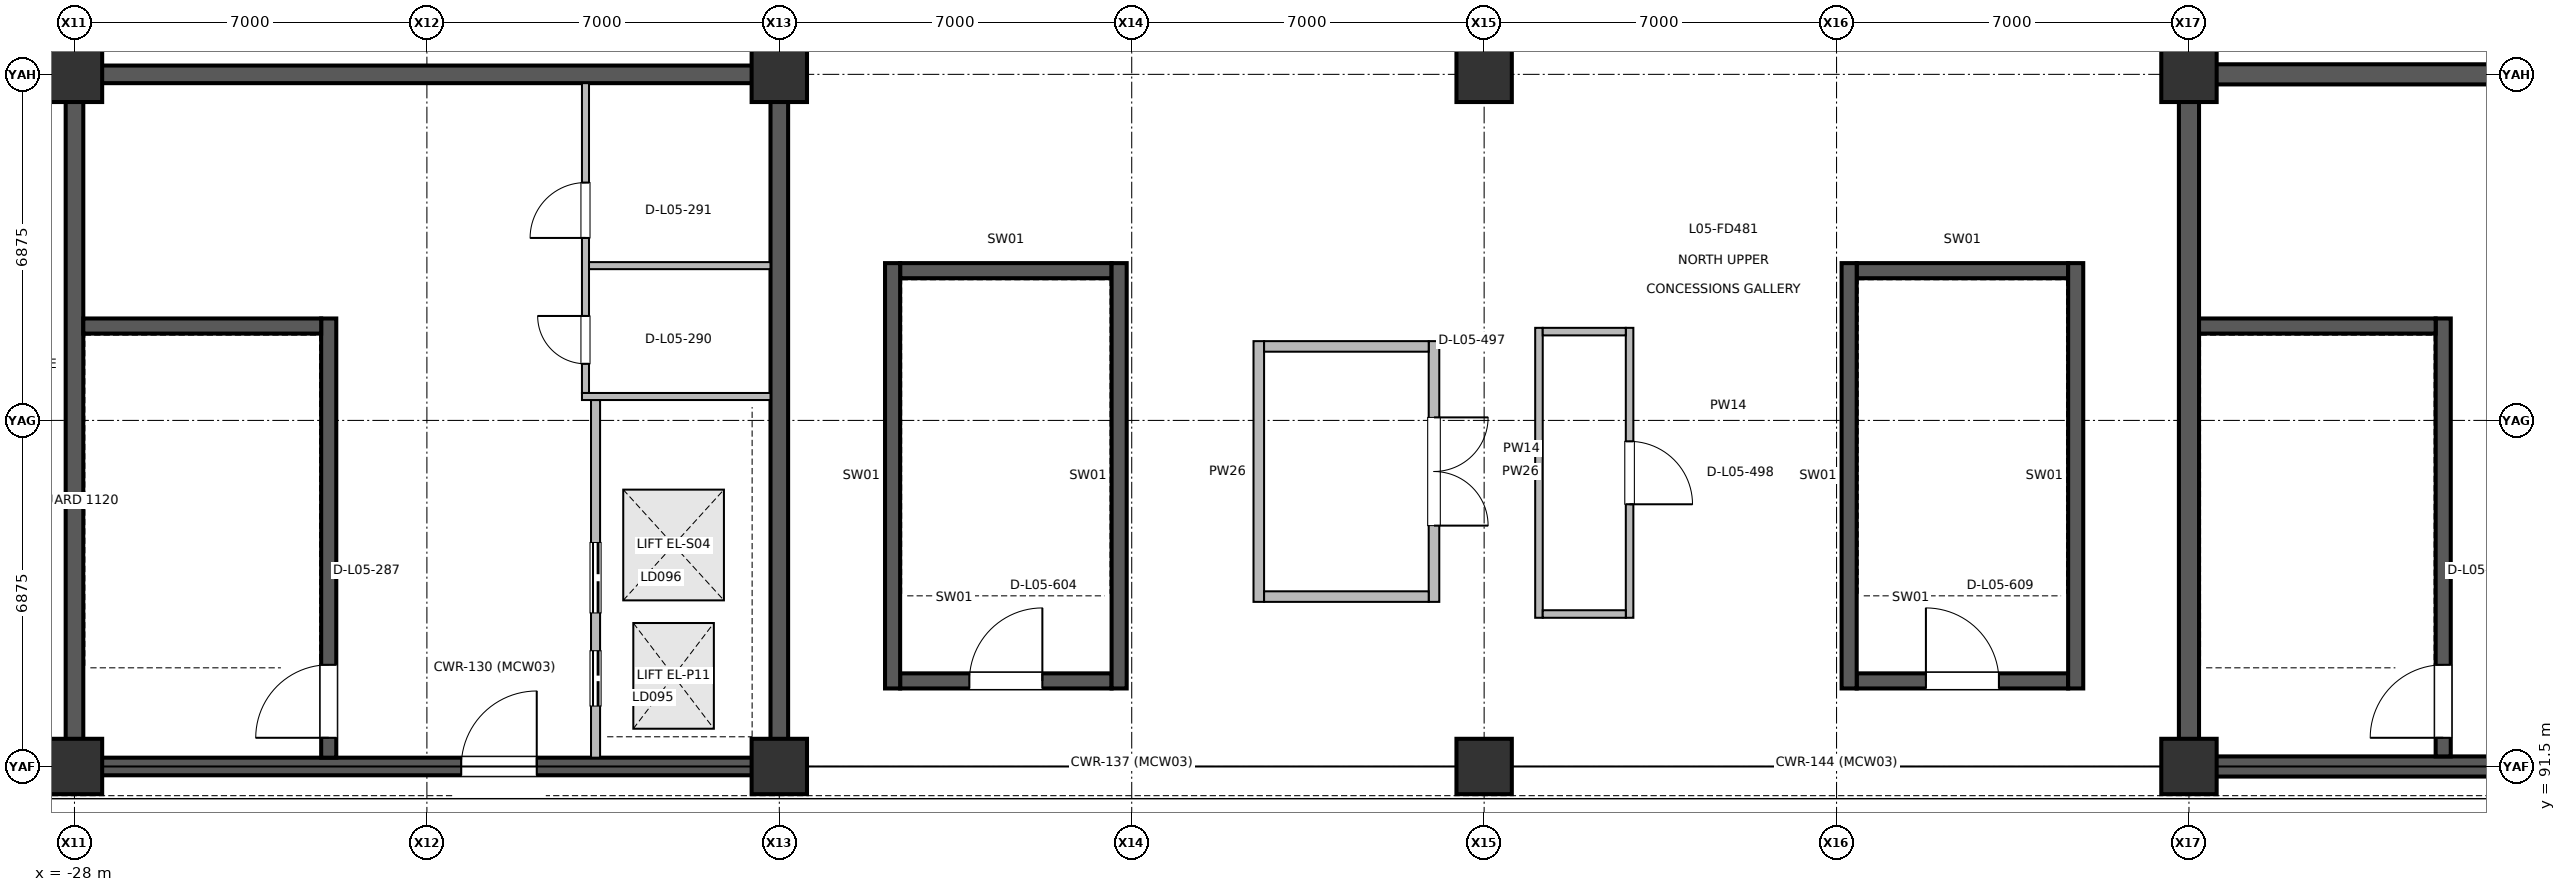
"""IFC4 building model, lengths in metres.
Left out: names, types, materials, properties, quantities, classifications, styles, units other than length and angle.
Written with IfcOpenShell. Run it as: python <this file> out.ifc"""

import sys

from ifc_helpers import new_model, si_unit, direction, frame, frame_2d, origin, origin_2d, place, context, subcontext, project, spatial, rectangle, circle, extrude, element, fill, save


model = new_model("IFC4")
c1 = context("Model", 3, precision=1e-05, world=origin(), true_north=direction((0.0, 1.0)))
c2 = subcontext(c1, "Body", "Model", "MODEL_VIEW")
j1 = project(units=[si_unit("LENGTHUNIT", "METRE"), si_unit("PLANEANGLEUNIT", "RADIAN")], contexts=[c1])
p1 = place(None, origin())
s1 = spatial("IfcSite", under=j1, at=p1, CompositionType="ELEMENT")
p2 = place(p1, origin())
s2 = spatial("IfcBuilding", under=s1, at=p2, CompositionType="ELEMENT")
p3 = place(p2, frame((0.0, 0.0, 21.0)))
s3 = spatial("IfcBuildingStorey", under=s2, at=p3, CompositionType="ELEMENT", Elevation=21.0)
for number, where, z_axis, x_axis in (
    (1, (-28.0, 91.5, 0.0), (0.0, 0.0, 1.0), (1.0, 0.0, 0.0)),
    (2, (-28.0, 105.25, 0.0), (0.0, 0.0, 1.0), (1.0, 0.0, 0.0)),
    (3, (-14.0, 91.5, 0.0), (0.0, 0.0, 1.0), (1.0, 0.0, 0.0)),
    (4, (-14.0, 105.25, 0.0), (0.0, 0.0, 1.0), (1.0, 0.0, 0.0)),
    (5, (0.0, 91.5, 0.0), (0.0, 0.0, 1.0), (1.0, 0.0, 0.0)),
    (6, (0.0, 105.25, 0.0), (0.0, 0.0, 1.0), (1.0, 0.0, 0.0)),
    (7, (14.0, 91.5, 0.0), (0.0, 0.0, 1.0), (1.0, 0.0, 0.0)),
    (8, (14.0, 105.25, 0.0), (0.0, 0.0, 1.0), (1.0, 0.0, 0.0)),
):
    element("IfcColumn", number, at=place(p3, frame(where, z_axis=z_axis, x_axis=x_axis)), inside=s3, PredefinedType="COLUMN", context=c2, shape_type="SweptSolid", body=[
        extrude(circle(Radius=0.55, at=origin_2d()), origin(), (0.0, 0.0, 1.0), 5.185),
    ])
for number, where, z_axis, x_axis in (
    (9, (-28.0, 91.675, 0.0), (0.0, 0.0, 1.0), (0.0, 1.0, 0.0)),
    (10, (-14.0, 91.675, 0.0), (0.0, 0.0, 1.0), (0.0, 1.0, 0.0)),
):
    element("IfcWall", number, at=place(p3, frame(where, z_axis=z_axis, x_axis=x_axis)), inside=s3, PredefinedType="SHEAR", context=c2, shape_type="SweptSolid", body=[
        extrude(rectangle(XDim=13.4, YDim=0.35, at=frame_2d((6.7, 0.0))), origin(), (0.0, 0.0, 1.0), 5.185),
    ])
p4 = place(p3, frame((-27.825, 91.5, 0.0), z_axis=(0.0, 0.0, 1.0), x_axis=(1.0, 0.0, 0.0)))
e11 = element("IfcWall", 11, at=p4, inside=s3, PredefinedType="SHEAR", context=c2, shape_type="SweptSolid", body=[
    extrude(rectangle(XDim=13.65, YDim=0.35, at=frame_2d((6.825, 0.0))), origin(), (0.0, 0.0, 1.0), 5.185),
])
p5 = place(p4, frame((7.507, 0.0, 0.0)))
e12 = element("IfcOpeningElement", 12, at=p5, cuts=e11, PredefinedType="OPENING", context=c2, shape_type="SweptSolid", body=[
    extrude(rectangle(XDim=1.5, YDim=2.2, at=frame_2d((0.75, 1.1))), frame((0.0, 0.185, 0.0), z_axis=(0.0, -1.0, 0.0), x_axis=(1.0, 0.0, 0.0)), (0.0, 0.0, 1.0), 0.37),
])
p6 = place(p3, frame((-27.825, 105.25, 0.0), z_axis=(0.0, 0.0, 1.0), x_axis=(1.0, 0.0, 0.0)))
e13 = element("IfcWall", 13, at=p6, inside=s3, PredefinedType="SHEAR", context=c2, shape_type="SweptSolid", body=[
    extrude(rectangle(XDim=13.65, YDim=0.35, at=frame_2d((6.825, 0.0))), origin(), (0.0, 0.0, 1.0), 5.185),
])
p7 = place(p3, frame((14.0, 91.7, 0.0), z_axis=(0.0, 0.0, 1.0), x_axis=(0.0, 1.0, 0.0)))
e14 = element("IfcWall", 14, at=p7, inside=s3, PredefinedType="SHEAR", context=c2, shape_type="SweptSolid", body=[
    extrude(rectangle(XDim=13.35, YDim=0.4, at=frame_2d((6.675, 0.0))), origin(), (0.0, 0.0, 1.0), 5.185),
])
p8 = place(p3, frame((14.2, 91.5, 0.0), z_axis=(0.0, 0.0, 1.0), x_axis=(1.0, 0.0, 0.0)))
e15 = element("IfcWall", 15, at=p8, inside=s3, PredefinedType="SHEAR", context=c2, shape_type="SweptSolid", body=[
    extrude(rectangle(XDim=13.6, YDim=0.4, at=frame_2d((6.8, 0.0))), origin(), (0.0, 0.0, 1.0), 5.185),
])
p9 = place(p8, frame((7.48, 0.0, 0.0)))
e16 = element("IfcOpeningElement", 16, at=p9, cuts=e15, PredefinedType="OPENING", context=c2, shape_type="SweptSolid", body=[
    extrude(rectangle(XDim=1.5, YDim=2.2, at=frame_2d((0.75, 1.1))), frame((0.0, 0.21, 0.0), z_axis=(0.0, -1.0, 0.0), x_axis=(1.0, 0.0, 0.0)), (0.0, 0.0, 1.0), 0.42),
])
p10 = place(p3, frame((14.2, 105.25, 0.0), z_axis=(0.0, 0.0, 1.0), x_axis=(1.0, 0.0, 0.0)))
e17 = element("IfcWall", 17, at=p10, inside=s3, PredefinedType="SHEAR", context=c2, shape_type="SweptSolid", body=[
    extrude(rectangle(XDim=13.6, YDim=0.4, at=frame_2d((6.8, 0.0))), origin(), (0.0, 0.0, 1.0), 5.185),
])
p11 = place(p3, frame((-22.95, 91.675, 0.0), z_axis=(0.0, 0.0, 1.0), x_axis=(0.0, 1.0, 0.0)))
e18 = element("IfcWall", 18, at=p11, inside=s3, PredefinedType="SHEAR", context=c2, shape_type="SweptSolid", body=[
    extrude(rectangle(XDim=8.725, YDim=0.3, at=frame_2d((4.362, 0.0))), origin(), (0.0, 0.0, 1.0), 5.185),
])
p12 = place(p11, frame((0.395, 0.0, 0.0)))
e19 = element("IfcOpeningElement", 19, at=p12, cuts=e18, PredefinedType="OPENING", context=c2, shape_type="SweptSolid", body=[
    extrude(rectangle(XDim=1.45, YDim=2.2, at=frame_2d((0.725, 1.1))), frame((0.0, 0.16, 0.0), z_axis=(0.0, -1.0, 0.0), x_axis=(1.0, 0.0, 0.0)), (0.0, 0.0, 1.0), 0.32),
])
p13 = place(p3, frame((-17.65, 91.675, 0.0), z_axis=(0.0, 0.0, 1.0), x_axis=(0.0, 1.0, 0.0)))
e20 = element("IfcWall", 20, at=p13, inside=s3, PredefinedType="PARTITIONING", context=c2, shape_type="SweptSolid", body=[
    extrude(rectangle(XDim=7.105, YDim=0.18, at=frame_2d((3.552, 0.0))), origin(), (0.0, 0.0, 1.0), 4.42),
])
p14 = place(p13, frame((1.025, 0.0, 0.0)))
e21 = element("IfcOpeningElement", 21, at=p14, cuts=e20, PredefinedType="OPENING", context=c2, shape_type="SweptSolid", body=[
    extrude(rectangle(XDim=1.1, YDim=2.2, at=frame_2d((0.55, 1.1))), frame((0.0, 0.1, 0.0), z_axis=(0.0, -1.0, 0.0), x_axis=(1.0, 0.0, 0.0)), (0.0, 0.0, 1.0), 0.2),
])
p15 = place(p13, frame((2.875, 0.0, 0.0)))
e22 = element("IfcOpeningElement", 22, at=p15, cuts=e20, PredefinedType="OPENING", context=c2, shape_type="SweptSolid", body=[
    extrude(rectangle(XDim=1.4, YDim=2.3, at=frame_2d((0.7, 1.15))), frame((0.0, 0.1, 0.0), z_axis=(0.0, -1.0, 0.0), x_axis=(1.0, 0.0, 0.0)), (0.0, 0.0, 1.0), 0.2),
])
p16 = place(p3, frame((-17.85, 98.92, 0.0), z_axis=(0.0, 0.0, 1.0), x_axis=(0.0, 1.0, 0.0)))
e23 = element("IfcWall", 23, at=p16, inside=s3, PredefinedType="PARTITIONING", context=c2, shape_type="SweptSolid", body=[
    extrude(rectangle(XDim=6.155, YDim=0.14, at=frame_2d((3.078, 0.0))), origin(), (0.0, 0.0, 1.0), 4.42),
])
p17 = place(p16, frame((0.58, 0.0, 0.0)))
e24 = element("IfcOpeningElement", 24, at=p17, cuts=e23, PredefinedType="OPENING", context=c2, shape_type="SweptSolid", body=[
    extrude(rectangle(XDim=0.95, YDim=2.15, at=frame_2d((0.475, 1.075))), frame((0.0, 0.08, 0.0), z_axis=(0.0, -1.0, 0.0), x_axis=(1.0, 0.0, 0.0)), (0.0, 0.0, 1.0), 0.16),
])
p18 = place(p16, frame((3.08, 0.0, 0.0)))
e25 = element("IfcOpeningElement", 25, at=p18, cuts=e23, PredefinedType="OPENING", context=c2, shape_type="SweptSolid", body=[
    extrude(rectangle(XDim=1.1, YDim=2.15, at=frame_2d((0.55, 1.075))), frame((0.0, 0.08, 0.0), z_axis=(0.0, -1.0, 0.0), x_axis=(1.0, 0.0, 0.0)), (0.0, 0.0, 1.0), 0.16),
])
p19 = place(p3, frame((19.05, 91.7, 0.0), z_axis=(0.0, 0.0, 1.0), x_axis=(0.0, 1.0, 0.0)))
e26 = element("IfcWall", 26, at=p19, inside=s3, PredefinedType="SHEAR", context=c2, shape_type="SweptSolid", body=[
    extrude(rectangle(XDim=8.7, YDim=0.3, at=frame_2d((4.35, 0.0))), origin(), (0.0, 0.0, 1.0), 5.185),
])
p20 = place(p19, frame((0.37, 0.0, 0.0)))
e27 = element("IfcOpeningElement", 27, at=p20, cuts=e26, PredefinedType="OPENING", context=c2, shape_type="SweptSolid", body=[
    extrude(rectangle(XDim=1.45, YDim=2.2, at=frame_2d((0.725, 1.1))), frame((0.0, 0.16, 0.0), z_axis=(0.0, -1.0, 0.0), x_axis=(1.0, 0.0, 0.0)), (0.0, 0.0, 1.0), 0.32),
])
p21 = place(p3, frame((-0.996, 99.95, 0.0), z_axis=(0.0, 0.0, 1.0), x_axis=(0.0, -1.0, 0.0)))
e28 = element("IfcWall", 28, at=p21, inside=s3, PredefinedType="PARTITIONING", context=c2, shape_type="SweptSolid", body=[
    extrude(rectangle(XDim=5.18, YDim=0.21, at=frame_2d((2.59, 0.0))), origin(), (0.0, 0.0, 1.0), 4.42),
])
p22 = place(p21, frame((1.515, 0.0, 0.0)))
e29 = element("IfcOpeningElement", 29, at=p22, cuts=e28, PredefinedType="OPENING", context=c2, shape_type="SweptSolid", body=[
    extrude(rectangle(XDim=2.15, YDim=2.45, at=frame_2d((1.075, 1.225))), frame((0.0, 0.115, 0.0), z_axis=(0.0, -1.0, 0.0), x_axis=(1.0, 0.0, 0.0)), (0.0, 0.0, 1.0), 0.23),
])
p23 = place(p3, frame((2.889, 100.214, 0.0), z_axis=(0.0, 0.0, 1.0), x_axis=(0.0, -1.0, 0.0)))
e30 = element("IfcWall", 30, at=p23, inside=s3, PredefinedType="PARTITIONING", context=c2, shape_type="SweptSolid", body=[
    extrude(rectangle(XDim=5.76, YDim=0.15, at=frame_2d((2.88, 0.0))), origin(), (0.0, 0.0, 1.0), 4.42),
])
p24 = place(p23, frame((2.255, 0.0, 0.0)))
e31 = element("IfcOpeningElement", 31, at=p24, cuts=e30, PredefinedType="OPENING", context=c2, shape_type="SweptSolid", body=[
    extrude(rectangle(XDim=1.25, YDim=2.2, at=frame_2d((0.625, 1.1))), frame((0.0, 0.085, 0.0), z_axis=(0.0, -1.0, 0.0), x_axis=(1.0, 0.0, 0.0)), (0.0, 0.0, 1.0), 0.17),
])
p25 = place(p3, frame((-17.92, 98.85, 0.0), z_axis=(0.0, 0.0, 1.0), x_axis=(1.0, 0.0, 0.0)))
e32 = element("IfcWall", 32, at=p25, inside=s3, PredefinedType="PARTITIONING", context=c2, shape_type="SweptSolid", body=[
    extrude(rectangle(XDim=3.745, YDim=0.14, at=frame_2d((1.873, 0.0))), origin(), (0.0, 0.0, 1.0), 4.42),
])
p26 = place(p3, frame((-17.78, 101.45, 0.0), z_axis=(0.0, 0.0, 1.0), x_axis=(1.0, 0.0, 0.0)))
e33 = element("IfcWall", 33, at=p26, inside=s3, PredefinedType="PARTITIONING", context=c2, shape_type="SweptSolid", body=[
    extrude(rectangle(XDim=3.605, YDim=0.14, at=frame_2d((1.802, 0.0))), origin(), (0.0, 0.0, 1.0), 4.42),
])
p27 = place(p3, frame((-4.476, 94.77, 0.0), z_axis=(0.0, 0.0, 1.0), x_axis=(0.0, 1.0, 0.0)))
e34 = element("IfcWall", 34, at=p27, inside=s3, PredefinedType="PARTITIONING", context=c2, shape_type="SweptSolid", body=[
    extrude(rectangle(XDim=5.18, YDim=0.21, at=frame_2d((2.59, 0.0))), origin(), (0.0, 0.0, 1.0), 4.42),
])
for number, where, z_axis, x_axis in (
    (35, (-4.371, 94.875, 0.0), (0.0, 0.0, 1.0), (1.0, 0.0, 0.0)),
    (36, (-4.371, 99.845, 0.0), (0.0, 0.0, 1.0), (1.0, 0.0, 0.0)),
):
    element("IfcWall", number, at=place(p3, frame(where, z_axis=z_axis, x_axis=x_axis)), inside=s3, PredefinedType="PARTITIONING", context=c2, shape_type="SweptSolid", body=[
        extrude(rectangle(XDim=3.27, YDim=0.21, at=frame_2d((1.635, 0.0))), origin(), (0.0, 0.0, 1.0), 4.42),
    ])
p28 = place(p3, frame((1.089, 94.454, 0.0), z_axis=(0.0, 0.0, 1.0), x_axis=(0.0, 1.0, 0.0)))
e37 = element("IfcWall", 37, at=p28, inside=s3, PredefinedType="PARTITIONING", context=c2, shape_type="SweptSolid", body=[
    extrude(rectangle(XDim=5.76, YDim=0.15, at=frame_2d((2.88, 0.0))), origin(), (0.0, 0.0, 1.0), 4.42),
])
for number, where, z_axis, x_axis in (
    (38, (1.164, 94.529, 0.0), (0.0, 0.0, 1.0), (1.0, 0.0, 0.0)),
    (39, (1.164, 100.139, 0.0), (0.0, 0.0, 1.0), (1.0, 0.0, 0.0)),
):
    element("IfcWall", number, at=place(p3, frame(where, z_axis=z_axis, x_axis=x_axis)), inside=s3, PredefinedType="PARTITIONING", context=c2, shape_type="SweptSolid", body=[
        extrude(rectangle(XDim=1.65, YDim=0.15, at=frame_2d((0.825, 0.0))), origin(), (0.0, 0.0, 1.0), 4.42),
    ])
p29 = place(p3, frame((-27.825, 100.25, 0.0), z_axis=(0.0, 0.0, 1.0), x_axis=(1.0, 0.0, 0.0)))
e40 = element("IfcWall", 40, at=p29, inside=s3, PredefinedType="SHEAR", context=c2, shape_type="SweptSolid", body=[
    extrude(rectangle(XDim=4.725, YDim=0.3, at=frame_2d((2.362, 0.0))), origin(), (0.0, 0.0, 1.0), 5.185),
])
p30 = place(p3, frame((14.2, 100.25, 0.0), z_axis=(0.0, 0.0, 1.0), x_axis=(1.0, 0.0, 0.0)))
e41 = element("IfcWall", 41, at=p30, inside=s3, PredefinedType="SHEAR", context=c2, shape_type="SweptSolid", body=[
    extrude(rectangle(XDim=4.7, YDim=0.3, at=frame_2d((2.35, 0.0))), origin(), (0.0, 0.0, 1.0), 5.185),
])
p31 = place(p3, frame((-11.6, 93.2, 0.0), z_axis=(0.0, 0.0, 1.0), x_axis=(1.0, 0.0, 0.0)))
e42 = element("IfcWall", 42, at=p31, inside=s3, PredefinedType="SHEAR", context=c2, shape_type="SweptSolid", body=[
    extrude(rectangle(XDim=4.2, YDim=0.3, at=frame_2d((2.1, 0.0))), origin(), (0.0, 0.0, 1.0), 5.185),
])
p32 = place(p31, frame((1.375, 0.0, 0.0)))
e43 = element("IfcOpeningElement", 43, at=p32, cuts=e42, PredefinedType="OPENING", context=c2, shape_type="SweptSolid", body=[
    extrude(rectangle(XDim=1.45, YDim=2.2, at=frame_2d((0.725, 1.1))), frame((0.0, 0.16, 0.0), z_axis=(0.0, -1.0, 0.0), x_axis=(1.0, 0.0, 0.0)), (0.0, 0.0, 1.0), 0.32),
])
p33 = place(p3, frame((-11.6, 101.35, 0.0), z_axis=(0.0, 0.0, 1.0), x_axis=(1.0, 0.0, 0.0)))
e44 = element("IfcWall", 44, at=p33, inside=s3, PredefinedType="SHEAR", context=c2, shape_type="SweptSolid", body=[
    extrude(rectangle(XDim=4.2, YDim=0.3, at=frame_2d((2.1, 0.0))), origin(), (0.0, 0.0, 1.0), 5.185),
])
for number, where, z_axis, x_axis in (
    (45, (-11.75, 93.05, 0.0), (0.0, 0.0, 1.0), (0.0, 1.0, 0.0)),
    (46, (-7.25, 93.05, 0.0), (0.0, 0.0, 1.0), (0.0, 1.0, 0.0)),
):
    element("IfcWall", number, at=place(p3, frame(where, z_axis=z_axis, x_axis=x_axis)), inside=s3, PredefinedType="SHEAR", context=c2, shape_type="SweptSolid", body=[
        extrude(rectangle(XDim=8.45, YDim=0.3, at=frame_2d((4.225, 0.0))), origin(), (0.0, 0.0, 1.0), 5.185),
    ])
p34 = place(p3, frame((7.4, 93.2, 0.0), z_axis=(0.0, 0.0, 1.0), x_axis=(1.0, 0.0, 0.0)))
e47 = element("IfcWall", 47, at=p34, inside=s3, PredefinedType="SHEAR", context=c2, shape_type="SweptSolid", body=[
    extrude(rectangle(XDim=4.2, YDim=0.3, at=frame_2d((2.1, 0.0))), origin(), (0.0, 0.0, 1.0), 5.185),
])
p35 = place(p34, frame((1.375, 0.0, 0.0)))
e48 = element("IfcOpeningElement", 48, at=p35, cuts=e47, PredefinedType="OPENING", context=c2, shape_type="SweptSolid", body=[
    extrude(rectangle(XDim=1.45, YDim=2.2, at=frame_2d((0.725, 1.1))), frame((0.0, 0.16, 0.0), z_axis=(0.0, -1.0, 0.0), x_axis=(1.0, 0.0, 0.0)), (0.0, 0.0, 1.0), 0.32),
])
p36 = place(p3, frame((7.4, 101.35, 0.0), z_axis=(0.0, 0.0, 1.0), x_axis=(1.0, 0.0, 0.0)))
e49 = element("IfcWall", 49, at=p36, inside=s3, PredefinedType="SHEAR", context=c2, shape_type="SweptSolid", body=[
    extrude(rectangle(XDim=4.2, YDim=0.3, at=frame_2d((2.1, 0.0))), origin(), (0.0, 0.0, 1.0), 5.185),
])
for number, where, z_axis, x_axis in (
    (50, (7.25, 93.05, 0.0), (0.0, 0.0, 1.0), (0.0, 1.0, 0.0)),
    (51, (11.75, 93.05, 0.0), (0.0, 0.0, 1.0), (0.0, 1.0, 0.0)),
):
    element("IfcWall", number, at=place(p3, frame(where, z_axis=z_axis, x_axis=x_axis)), inside=s3, PredefinedType="SHEAR", context=c2, shape_type="SweptSolid", body=[
        extrude(rectangle(XDim=8.45, YDim=0.3, at=frame_2d((4.225, 0.0))), origin(), (0.0, 0.0, 1.0), 5.185),
    ])
p37 = place(p5, origin())
e52 = element("IfcDoor", 52, at=p37, inside=s3, OperationType="SINGLE_SWING_RIGHT", PredefinedType="DOOR", context=c2, shape_type="SweptSolid", body=[
    extrude(rectangle(XDim=1.5, YDim=2.2, at=frame_2d((0.75, 1.1))), frame((0.0, 0.025, 0.0), z_axis=(0.0, -1.0, 0.0), x_axis=(1.0, 0.0, 0.0)), (0.0, 0.0, 1.0), 0.05),
])
fill(e12, e52)
p38 = place(p12, origin())
e53 = element("IfcDoor", 53, at=p38, inside=s3, OperationType="SINGLE_SWING_LEFT", PredefinedType="DOOR", context=c2, shape_type="SweptSolid", body=[
    extrude(rectangle(XDim=1.45, YDim=2.2, at=frame_2d((0.725, 1.1))), frame((0.0, 0.025, 0.0), z_axis=(0.0, -1.0, 0.0), x_axis=(1.0, 0.0, 0.0)), (0.0, 0.0, 1.0), 0.05),
])
fill(e19, e53)
p39 = place(p14, origin())
e54 = element("IfcDoor", 54, at=p39, inside=s3, OperationType="DOUBLE_DOOR_SLIDING", PredefinedType="DOOR", context=c2, shape_type="SweptSolid", body=[
    extrude(rectangle(XDim=1.1, YDim=2.2, at=frame_2d((0.55, 1.1))), frame((0.0, 0.025, 0.0), z_axis=(0.0, -1.0, 0.0), x_axis=(1.0, 0.0, 0.0)), (0.0, 0.0, 1.0), 0.05),
])
fill(e21, e54)
p40 = place(p15, origin())
e55 = element("IfcDoor", 55, at=p40, inside=s3, OperationType="DOUBLE_DOOR_SLIDING", PredefinedType="DOOR", context=c2, shape_type="SweptSolid", body=[
    extrude(rectangle(XDim=1.4, YDim=2.3, at=frame_2d((0.7, 1.15))), frame((0.0, 0.025, 0.0), z_axis=(0.0, -1.0, 0.0), x_axis=(1.0, 0.0, 0.0)), (0.0, 0.0, 1.0), 0.05),
])
fill(e22, e55)
p41 = place(p17, origin())
e56 = element("IfcDoor", 56, at=p41, inside=s3, OperationType="SINGLE_SWING_RIGHT", PredefinedType="DOOR", context=c2, shape_type="SweptSolid", body=[
    extrude(rectangle(XDim=0.95, YDim=2.15, at=frame_2d((0.475, 1.075))), frame((0.0, 0.025, 0.0), z_axis=(0.0, -1.0, 0.0), x_axis=(1.0, 0.0, 0.0)), (0.0, 0.0, 1.0), 0.05),
])
fill(e24, e56)
p42 = place(p18, origin())
e57 = element("IfcDoor", 57, at=p42, inside=s3, OperationType="SINGLE_SWING_LEFT", PredefinedType="DOOR", context=c2, shape_type="SweptSolid", body=[
    extrude(rectangle(XDim=1.1, YDim=2.15, at=frame_2d((0.55, 1.075))), frame((0.0, 0.025, 0.0), z_axis=(0.0, -1.0, 0.0), x_axis=(1.0, 0.0, 0.0)), (0.0, 0.0, 1.0), 0.05),
])
fill(e25, e57)
p43 = place(p20, origin())
e58 = element("IfcDoor", 58, at=p43, inside=s3, OperationType="SINGLE_SWING_LEFT", PredefinedType="DOOR", context=c2, shape_type="SweptSolid", body=[
    extrude(rectangle(XDim=1.45, YDim=2.2, at=frame_2d((0.725, 1.1))), frame((0.0, 0.025, 0.0), z_axis=(0.0, -1.0, 0.0), x_axis=(1.0, 0.0, 0.0)), (0.0, 0.0, 1.0), 0.05),
])
fill(e27, e58)
p44 = place(p22, origin())
e59 = element("IfcDoor", 59, at=p44, inside=s3, OperationType="DOUBLE_DOOR_SINGLE_SWING", PredefinedType="DOOR", context=c2, shape_type="SweptSolid", body=[
    extrude(rectangle(XDim=2.15, YDim=2.45, at=frame_2d((1.075, 1.225))), frame((0.0, 0.025, 0.0), z_axis=(0.0, -1.0, 0.0), x_axis=(1.0, 0.0, 0.0)), (0.0, 0.0, 1.0), 0.05),
])
fill(e29, e59)
p45 = place(p24, origin())
e60 = element("IfcDoor", 60, at=p45, inside=s3, OperationType="SINGLE_SWING_RIGHT", PredefinedType="DOOR", context=c2, shape_type="SweptSolid", body=[
    extrude(rectangle(XDim=1.25, YDim=2.2, at=frame_2d((0.625, 1.1))), frame((0.0, 0.025, 0.0), z_axis=(0.0, -1.0, 0.0), x_axis=(1.0, 0.0, 0.0)), (0.0, 0.0, 1.0), 0.05),
])
fill(e31, e60)
p46 = place(p32, origin())
e61 = element("IfcDoor", 61, at=p46, inside=s3, OperationType="SINGLE_SWING_RIGHT", PredefinedType="DOOR", context=c2, shape_type="SweptSolid", body=[
    extrude(rectangle(XDim=1.45, YDim=2.2, at=frame_2d((0.725, 1.1))), frame((0.0, 0.025, 0.0), z_axis=(0.0, -1.0, 0.0), x_axis=(1.0, 0.0, 0.0)), (0.0, 0.0, 1.0), 0.05),
])
fill(e43, e61)
p47 = place(p35, origin())
e62 = element("IfcDoor", 62, at=p47, inside=s3, OperationType="SINGLE_SWING_LEFT", PredefinedType="DOOR", context=c2, shape_type="SweptSolid", body=[
    extrude(rectangle(XDim=1.45, YDim=2.2, at=frame_2d((0.725, 1.1))), frame((0.0, 0.025, 0.0), z_axis=(0.0, -1.0, 0.0), x_axis=(1.0, 0.0, 0.0)), (0.0, 0.0, 1.0), 0.05),
])
fill(e48, e62)
save(model, sys.argv[1])
